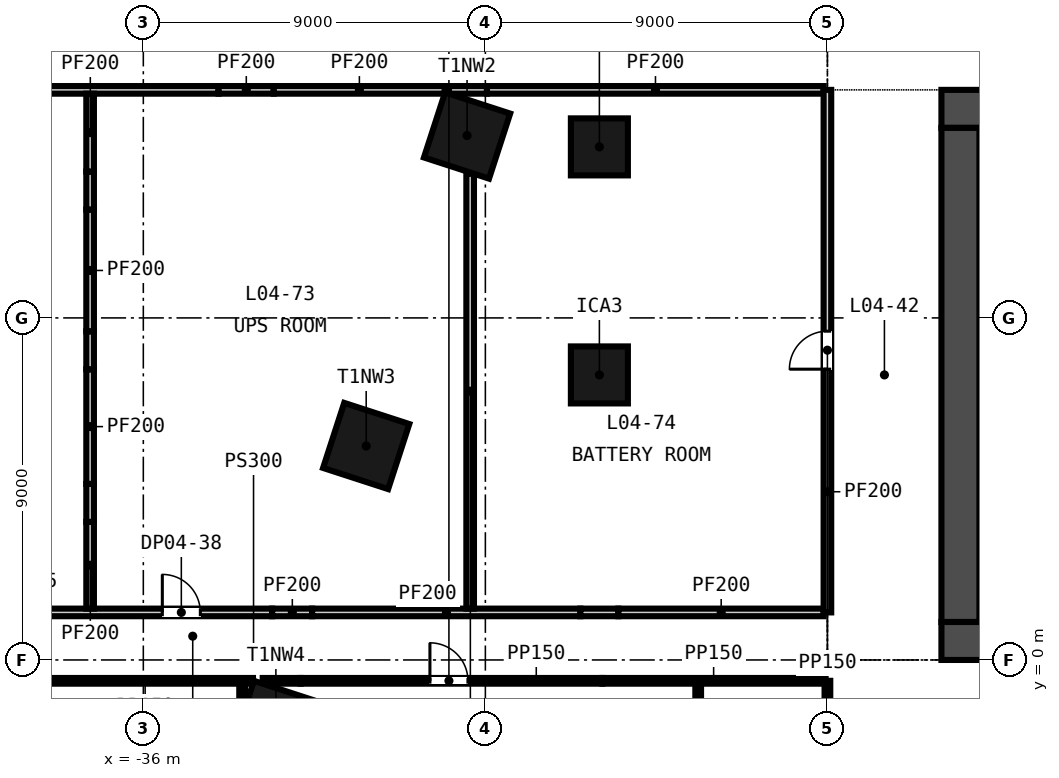
"""IFC4 building model, lengths in metres.
Left out: names, types, materials, properties, quantities, classifications, styles, units other than length and angle.
Written with IfcOpenShell. Run it as: python <this file> out.ifc"""

import sys

from ifc_helpers import new_model, si_unit, direction, frame, frame_2d, origin, origin_2d, place, context, subcontext, project, spatial, rectangle, extrude, element, fill, save


model = new_model("IFC4")
c1 = context("Model", 3, precision=1e-05, world=origin(), true_north=direction((0.0, 1.0)))
c2 = subcontext(c1, "Body", "Model", "MODEL_VIEW")
j1 = project(units=[si_unit("LENGTHUNIT", "METRE"), si_unit("PLANEANGLEUNIT", "RADIAN")], contexts=[c1])
p1 = place(None, origin())
s1 = spatial("IfcSite", under=j1, at=p1, CompositionType="ELEMENT")
p2 = place(p1, origin())
s2 = spatial("IfcBuilding", under=s1, at=p2, CompositionType="ELEMENT")
p3 = place(p2, frame((0.0, 0.0, 27.0)))
s3 = spatial("IfcBuildingStorey", under=s2, at=p3, CompositionType="ELEMENT", Elevation=27.0)
p4 = place(p3, frame((-15.0, 0.5, -0.3), z_axis=(0.0, 0.0, 1.0), x_axis=(1.0, 0.0, 0.0)))
e1 = element("IfcWall", 1, at=p4, inside=s3, PredefinedType="SOLIDWALL", context=c2, shape_type="SweptSolid", body=[
    extrude(rectangle(XDim=30.0, YDim=1.0, at=frame_2d((15.0, 0.0))), origin(), (0.0, 0.0, 1.0), 4.5),
])
p5 = place(p4, frame((5.8, 0.0, 0.3)))
e2 = element("IfcOpeningElement", 2, at=p5, cuts=e1, PredefinedType="OPENING", context=c2, shape_type="SweptSolid", body=[
    extrude(rectangle(XDim=2.4, YDim=2.4, at=frame_2d((1.2, 1.2))), frame((0.0, 0.51, 0.0), z_axis=(0.0, -1.0, 0.0), x_axis=(1.0, 0.0, 0.0)), (0.0, 0.0, 1.0), 1.02),
])
p6 = place(p4, frame((13.8, 0.0, 0.3)))
e3 = element("IfcOpeningElement", 3, at=p6, cuts=e1, PredefinedType="OPENING", context=c2, shape_type="SweptSolid", body=[
    extrude(rectangle(XDim=2.4, YDim=2.4, at=frame_2d((1.2, 1.2))), frame((0.0, 0.51, 0.0), z_axis=(0.0, -1.0, 0.0), x_axis=(1.0, 0.0, 0.0)), (0.0, 0.0, 1.0), 1.02),
])
p7 = place(p4, frame((21.8, 0.0, 0.3)))
e4 = element("IfcOpeningElement", 4, at=p7, cuts=e1, PredefinedType="OPENING", context=c2, shape_type="SweptSolid", body=[
    extrude(rectangle(XDim=2.4, YDim=2.4, at=frame_2d((1.2, 1.2))), frame((0.0, 0.51, 0.0), z_axis=(0.0, -1.0, 0.0), x_axis=(1.0, 0.0, 0.0)), (0.0, 0.0, 1.0), 1.02),
])
p8 = place(p4, frame((1.5, 0.0, 0.3)))
e5 = element("IfcOpeningElement", 5, at=p8, cuts=e1, PredefinedType="OPENING", context=c2, shape_type="SweptSolid", body=[
    extrude(rectangle(XDim=1.2, YDim=2.1, at=frame_2d((0.6, 1.05))), frame((0.0, 0.51, 0.0), z_axis=(0.0, -1.0, 0.0), x_axis=(1.0, 0.0, 0.0)), (0.0, 0.0, 1.0), 1.02),
])
p9 = place(p4, frame((27.3, 0.0, 0.3)))
e6 = element("IfcOpeningElement", 6, at=p9, cuts=e1, PredefinedType="OPENING", context=c2, shape_type="SweptSolid", body=[
    extrude(rectangle(XDim=1.2, YDim=2.1, at=frame_2d((0.6, 1.05))), frame((0.0, 0.51, 0.0), z_axis=(0.0, -1.0, 0.0), x_axis=(1.0, 0.0, 0.0)), (0.0, 0.0, 1.0), 1.02),
])
p10 = place(p3, frame((-15.0, 14.5, -0.3), z_axis=(0.0, 0.0, 1.0), x_axis=(1.0, 0.0, 0.0)))
e7 = element("IfcWall", 7, at=p10, inside=s3, PredefinedType="SOLIDWALL", context=c2, shape_type="SweptSolid", body=[
    extrude(rectangle(XDim=30.0, YDim=1.0, at=frame_2d((15.0, 0.0))), origin(), (0.0, 0.0, 1.0), 4.5),
])
p11 = place(p10, frame((9.25, 0.0, 0.3)))
e8 = element("IfcOpeningElement", 8, at=p11, cuts=e7, PredefinedType="OPENING", context=c2, shape_type="SweptSolid", body=[
    extrude(rectangle(XDim=1.5, YDim=2.1, at=frame_2d((0.75, 1.05))), frame((0.0, 0.51, 0.0), z_axis=(0.0, -1.0, 0.0), x_axis=(1.0, 0.0, 0.0)), (0.0, 0.0, 1.0), 1.02),
])
p12 = place(p10, frame((19.4, 0.0, 0.3)))
e9 = element("IfcOpeningElement", 9, at=p12, cuts=e7, PredefinedType="OPENING", context=c2, shape_type="SweptSolid", body=[
    extrude(rectangle(XDim=1.5, YDim=2.1, at=frame_2d((0.75, 1.05))), frame((0.0, 0.51, 0.0), z_axis=(0.0, -1.0, 0.0), x_axis=(1.0, 0.0, 0.0)), (0.0, 0.0, 1.0), 1.02),
])
p13 = place(p10, frame((1.5, 0.0, 0.3)))
e10 = element("IfcOpeningElement", 10, at=p13, cuts=e7, PredefinedType="OPENING", context=c2, shape_type="SweptSolid", body=[
    extrude(rectangle(XDim=1.2, YDim=2.1, at=frame_2d((0.6, 1.05))), frame((0.0, 0.51, 0.0), z_axis=(0.0, -1.0, 0.0), x_axis=(1.0, 0.0, 0.0)), (0.0, 0.0, 1.0), 1.02),
])
p14 = place(p10, frame((27.3, 0.0, 0.3)))
e11 = element("IfcOpeningElement", 11, at=p14, cuts=e7, PredefinedType="OPENING", context=c2, shape_type="SweptSolid", body=[
    extrude(rectangle(XDim=1.2, YDim=2.1, at=frame_2d((0.6, 1.05))), frame((0.0, 0.51, 0.0), z_axis=(0.0, -1.0, 0.0), x_axis=(1.0, 0.0, 0.0)), (0.0, 0.0, 1.0), 1.02),
])
p15 = place(p3, frame((-14.5, 1.0, -0.3), z_axis=(0.0, 0.0, 1.0), x_axis=(0.0, 1.0, 0.0)))
e12 = element("IfcWall", 12, at=p15, inside=s3, PredefinedType="SOLIDWALL", context=c2, shape_type="SweptSolid", body=[
    extrude(rectangle(XDim=13.0, YDim=1.0, at=frame_2d((6.5, 0.0))), origin(), (0.0, 0.0, 1.0), 4.5),
])
for number, where, z_axis, x_axis in (
    (13, (-27.482, 13.799, -0.3), (0.0, 0.0, 1.0), (-0.309, -0.951, 0.0)),
    (14, (-30.136, 5.63, -0.3), (0.0, 0.0, 1.0), (-0.309, -0.951, 0.0)),
    (15, (-32.512, -1.683, -0.3), (0.0, 0.0, 1.0), (-0.309, -0.951, 0.0)),
):
    element("IfcColumn", number, at=place(p3, frame(where, z_axis=z_axis, x_axis=x_axis)), inside=s3, PredefinedType="COLUMN", context=c2, shape_type="SweptSolid", body=[
        extrude(rectangle(XDim=1.8, YDim=1.8, at=origin_2d()), origin(), (0.0, 0.0, 1.0), 4.5),
    ])
for number, where, z_axis, x_axis in (
    (16, (-24.0, 7.5, -0.3), (0.0, 0.0, 1.0), (1.0, 0.0, 0.0)),
    (17, (-24.0, 13.5, -0.3), (0.0, 0.0, 1.0), (1.0, 0.0, 0.0)),
):
    element("IfcColumn", number, at=place(p3, frame(where, z_axis=z_axis, x_axis=x_axis)), inside=s3, PredefinedType="COLUMN", context=c2, shape_type="SweptSolid", body=[
        extrude(rectangle(XDim=1.5, YDim=1.5, at=origin_2d()), origin(), (0.0, 0.0, 1.0), 4.5),
    ])
p16 = place(p3, frame((-51.0, -0.549, 0.0), z_axis=(0.0, 0.0, 1.0), x_axis=(1.0, 0.0, 0.0)))
e18 = element("IfcWall", 18, at=p16, inside=s3, PredefinedType="PARTITIONING", context=c2, shape_type="SweptSolid", body=[
    extrude(rectangle(XDim=17.886, YDim=0.15, at=frame_2d((8.943, 0.0))), origin(), (0.0, 0.0, 1.0), 4.2),
])
p17 = place(p16, frame((4.9, 0.0, 0.0)))
e19 = element("IfcOpeningElement", 19, at=p17, cuts=e18, PredefinedType="OPENING", context=c2, shape_type="SweptSolid", body=[
    extrude(rectangle(XDim=1.0, YDim=2.1, at=frame_2d((0.5, 1.05))), frame((0.0, 0.085, 0.0), z_axis=(0.0, -1.0, 0.0), x_axis=(1.0, 0.0, 0.0)), (0.0, 0.0, 1.0), 0.17),
])
p18 = place(p16, frame((11.15, 0.0, 0.0)))
e20 = element("IfcOpeningElement", 20, at=p18, cuts=e18, PredefinedType="OPENING", context=c2, shape_type="SweptSolid", body=[
    extrude(rectangle(XDim=1.0, YDim=2.1, at=frame_2d((0.5, 1.05))), frame((0.0, 0.085, 0.0), z_axis=(0.0, -1.0, 0.0), x_axis=(1.0, 0.0, 0.0)), (0.0, 0.0, 1.0), 0.17),
])
p19 = place(p3, frame((-32.859, -0.549, 0.0), z_axis=(0.0, 0.0, 1.0), x_axis=(1.0, 0.0, 0.0)))
e21 = element("IfcWall", 21, at=p19, inside=s3, PredefinedType="PARTITIONING", context=c2, shape_type="SweptSolid", body=[
    extrude(rectangle(XDim=1.0, YDim=0.15, at=frame_2d((0.5, 0.0))), origin(), (0.0, 0.0, 1.0), 3.2),
])
p20 = place(p3, frame((-31.859, -0.549, 0.0), z_axis=(0.0, 0.0, 1.0), x_axis=(1.0, 0.0, 0.0)))
e22 = element("IfcWall", 22, at=p20, inside=s3, PredefinedType="PARTITIONING", context=c2, shape_type="SweptSolid", body=[
    extrude(rectangle(XDim=7.936, YDim=0.15, at=frame_2d((3.968, 0.0))), origin(), (0.0, 0.0, 1.0), 4.2),
])
p21 = place(p20, frame((3.4, 0.0, 0.0)))
e23 = element("IfcOpeningElement", 23, at=p21, cuts=e22, PredefinedType="OPENING", context=c2, shape_type="SweptSolid", body=[
    extrude(rectangle(XDim=1.0, YDim=2.1, at=frame_2d((0.5, 1.05))), frame((0.0, 0.085, 0.0), z_axis=(0.0, -1.0, 0.0), x_axis=(1.0, 0.0, 0.0)), (0.0, 0.0, 1.0), 0.17),
])
p22 = place(p3, frame((-23.923, -0.549, 0.0), z_axis=(0.0, 0.0, 1.0), x_axis=(1.0, 0.0, 0.0)))
e24 = element("IfcWall", 24, at=p22, inside=s3, PredefinedType="PARTITIONING", context=c2, shape_type="SweptSolid", body=[
    extrude(rectangle(XDim=5.848, YDim=0.15, at=frame_2d((2.924, 0.0))), origin(), (0.0, 0.0, 1.0), 3.521),
])
p23 = place(p3, frame((-51.4, 1.251, 0.0), z_axis=(0.0, 0.0, 1.0), x_axis=(1.0, 0.0, 0.0)))
e25 = element("IfcWall", 25, at=p23, inside=s3, PredefinedType="PARTITIONING", context=c2, shape_type="SweptSolid", body=[
    extrude(rectangle(XDim=18.79, YDim=0.2, at=frame_2d((9.395, 0.0))), origin(), (0.0, 0.0, 1.0), 4.2),
])
p24 = place(p23, frame((6.15, 0.0, 0.0)))
e26 = element("IfcOpeningElement", 26, at=p24, cuts=e25, PredefinedType="OPENING", context=c2, shape_type="SweptSolid", body=[
    extrude(rectangle(XDim=1.8, YDim=2.4, at=frame_2d((0.9, 1.2))), frame((0.0, 0.11, 0.0), z_axis=(0.0, -1.0, 0.0), x_axis=(1.0, 0.0, 0.0)), (0.0, 0.0, 1.0), 0.22),
])
p25 = place(p23, frame((15.9, 0.0, 0.0)))
e27 = element("IfcOpeningElement", 27, at=p25, cuts=e25, PredefinedType="OPENING", context=c2, shape_type="SweptSolid", body=[
    extrude(rectangle(XDim=1.0, YDim=2.1, at=frame_2d((0.5, 1.05))), frame((0.0, 0.11, 0.0), z_axis=(0.0, -1.0, 0.0), x_axis=(1.0, 0.0, 0.0)), (0.0, 0.0, 1.0), 0.22),
])
p26 = place(p3, frame((-32.61, 1.251, 0.0), z_axis=(0.0, 0.0, 1.0), x_axis=(1.0, 0.0, 0.0)))
e28 = element("IfcWall", 28, at=p26, inside=s3, PredefinedType="PARTITIONING", context=c2, shape_type="SweptSolid", body=[
    extrude(rectangle(XDim=1.052, YDim=0.2, at=frame_2d((0.526, 0.0))), origin(), (0.0, 0.0, 1.0), 3.2),
])
p27 = place(p3, frame((-31.559, 1.251, 0.0), z_axis=(0.0, 0.0, 1.0), x_axis=(1.0, 0.0, 0.0)))
e29 = element("IfcWall", 29, at=p27, inside=s3, PredefinedType="PARTITIONING", context=c2, shape_type="SweptSolid", body=[
    extrude(rectangle(XDim=7.059, YDim=0.2, at=frame_2d((3.529, 0.0))), origin(), (0.0, 0.0, 1.0), 4.2),
])
p28 = place(p3, frame((-24.5, 1.251, 0.0), z_axis=(0.0, 0.0, 1.0), x_axis=(1.0, 0.0, 0.0)))
e30 = element("IfcWall", 30, at=p28, inside=s3, PredefinedType="PARTITIONING", context=c2, shape_type="SweptSolid", body=[
    extrude(rectangle(XDim=1.0, YDim=0.2, at=frame_2d((0.5, 0.0))), origin(), (0.0, 0.0, 1.0), 3.286),
])
p29 = place(p3, frame((-23.5, 1.251, 0.0), z_axis=(0.0, 0.0, 1.0), x_axis=(1.0, 0.0, 0.0)))
e31 = element("IfcWall", 31, at=p29, inside=s3, PredefinedType="PARTITIONING", context=c2, shape_type="SweptSolid", body=[
    extrude(rectangle(XDim=5.4, YDim=0.2, at=frame_2d((2.7, 0.0))), origin(), (0.0, 0.0, 1.0), 4.2),
])
p30 = place(p3, frame((-44.615, 15.0, 0.0), z_axis=(0.0, 0.0, 1.0), x_axis=(1.0, 0.0, 0.0)))
e32 = element("IfcWall", 32, at=p30, inside=s3, PredefinedType="PARTITIONING", context=c2, shape_type="SweptSolid", body=[
    extrude(rectangle(XDim=10.594, YDim=0.2, at=frame_2d((5.297, 0.0))), origin(), (0.0, 0.0, 1.0), 4.2),
])
p31 = place(p3, frame((-34.021, 15.0, 0.0), z_axis=(0.0, 0.0, 1.0), x_axis=(1.0, 0.0, 0.0)))
e33 = element("IfcWall", 33, at=p31, inside=s3, PredefinedType="PARTITIONING", context=c2, shape_type="SweptSolid", body=[
    extrude(rectangle(XDim=1.452, YDim=0.2, at=frame_2d((0.726, 0.0))), origin(), (0.0, 0.0, 1.0), 3.111),
])
p32 = place(p3, frame((-32.569, 15.0, 0.0), z_axis=(0.0, 0.0, 1.0), x_axis=(1.0, 0.0, 0.0)))
e34 = element("IfcWall", 34, at=p32, inside=s3, PredefinedType="PARTITIONING", context=c2, shape_type="SweptSolid", body=[
    extrude(rectangle(XDim=4.499, YDim=0.2, at=frame_2d((2.25, 0.0))), origin(), (0.0, 0.0, 1.0), 4.2),
])
p33 = place(p3, frame((-27.958, 15.0, 0.0), z_axis=(0.0, 0.0, 1.0), x_axis=(1.0, 0.0, 0.0)))
e35 = element("IfcWall", 35, at=p33, inside=s3, PredefinedType="PARTITIONING", context=c2, shape_type="SweptSolid", body=[
    extrude(rectangle(XDim=1.0, YDim=0.2, at=frame_2d((0.5, 0.0))), origin(), (0.0, 0.0, 1.0), 3.2),
])
p34 = place(p3, frame((-26.958, 15.0, 0.0), z_axis=(0.0, 0.0, 1.0), x_axis=(1.0, 0.0, 0.0)))
e36 = element("IfcWall", 36, at=p34, inside=s3, PredefinedType="PARTITIONING", context=c2, shape_type="SweptSolid", body=[
    extrude(rectangle(XDim=8.858, YDim=0.2, at=frame_2d((4.429, 0.0))), origin(), (0.0, 0.0, 1.0), 4.2),
])
p35 = place(p3, frame((-37.4, 1.351, 0.0), z_axis=(0.0, 0.0, 1.0), x_axis=(0.0, 1.0, 0.0)))
e37 = element("IfcWall", 37, at=p35, inside=s3, PredefinedType="PARTITIONING", context=c2, shape_type="SweptSolid", body=[
    extrude(rectangle(XDim=2.282, YDim=0.2, at=frame_2d((1.141, 0.0))), origin(), (0.0, 0.0, 1.0), 4.2),
])
p36 = place(p3, frame((-37.4, 3.633, 0.0), z_axis=(0.0, 0.0, 1.0), x_axis=(0.0, 1.0, 0.0)))
e38 = element("IfcWall", 38, at=p36, inside=s3, PredefinedType="PARTITIONING", context=c2, shape_type="SweptSolid", body=[
    extrude(rectangle(XDim=1.0, YDim=0.2, at=frame_2d((0.5, 0.0))), origin(), (0.0, 0.0, 1.0), 3.286),
])
p37 = place(p3, frame((-37.4, 4.633, 0.0), z_axis=(0.0, 0.0, 1.0), x_axis=(0.0, 1.0, 0.0)))
e39 = element("IfcWall", 39, at=p37, inside=s3, PredefinedType="PARTITIONING", context=c2, shape_type="SweptSolid", body=[
    extrude(rectangle(XDim=3.014, YDim=0.2, at=frame_2d((1.507, 0.0))), origin(), (0.0, 0.0, 1.0), 4.2),
])
p38 = place(p3, frame((-37.4, 7.647, 0.0), z_axis=(0.0, 0.0, 1.0), x_axis=(0.0, 1.0, 0.0)))
e40 = element("IfcWall", 40, at=p38, inside=s3, PredefinedType="PARTITIONING", context=c2, shape_type="SweptSolid", body=[
    extrude(rectangle(XDim=1.0, YDim=0.2, at=frame_2d((0.5, 0.0))), origin(), (0.0, 0.0, 1.0), 3.286),
])
p39 = place(p3, frame((-37.4, 8.647, 0.0), z_axis=(0.0, 0.0, 1.0), x_axis=(0.0, 1.0, 0.0)))
e41 = element("IfcWall", 41, at=p39, inside=s3, PredefinedType="PARTITIONING", context=c2, shape_type="SweptSolid", body=[
    extrude(rectangle(XDim=3.204, YDim=0.2, at=frame_2d((1.602, 0.0))), origin(), (0.0, 0.0, 1.0), 4.2),
])
p40 = place(p3, frame((-37.4, 11.851, 0.0), z_axis=(0.0, 0.0, 1.0), x_axis=(0.0, 1.0, 0.0)))
e42 = element("IfcWall", 42, at=p40, inside=s3, PredefinedType="PARTITIONING", context=c2, shape_type="SweptSolid", body=[
    extrude(rectangle(XDim=1.0, YDim=0.2, at=frame_2d((0.5, 0.0))), origin(), (0.0, 0.0, 1.0), 3.219),
])
p41 = place(p3, frame((-37.4, 12.851, 0.0), z_axis=(0.0, 0.0, 1.0), x_axis=(0.0, 1.0, 0.0)))
e43 = element("IfcWall", 43, at=p41, inside=s3, PredefinedType="PARTITIONING", context=c2, shape_type="SweptSolid", body=[
    extrude(rectangle(XDim=2.049, YDim=0.2, at=frame_2d((1.025, 0.0))), origin(), (0.0, 0.0, 1.0), 4.2),
])
p42 = place(p3, frame((-33.4, -1.272, 0.0), z_axis=(0.0, 0.0, 1.0), x_axis=(0.0, 1.0, 0.0)))
e44 = element("IfcWall", 44, at=p42, inside=s3, PredefinedType="PARTITIONING", context=c2, shape_type="SweptSolid", body=[
    extrude(rectangle(XDim=0.648, YDim=0.15, at=frame_2d((0.324, 0.0))), origin(), (0.0, 0.0, 1.0), 4.2),
])
p43 = place(p3, frame((-27.4, 1.351, 0.0), z_axis=(0.0, 0.0, 1.0), x_axis=(0.0, 1.0, 0.0)))
e45 = element("IfcWall", 45, at=p43, inside=s3, PredefinedType="PARTITIONING", context=c2, shape_type="SweptSolid", body=[
    extrude(rectangle(XDim=11.443, YDim=0.2, at=frame_2d((5.721, 0.0))), origin(), (0.0, 0.0, 1.0), 4.2),
])
p44 = place(p3, frame((-21.4, -15.389, 0.0), z_axis=(0.0, 0.0, 1.0), x_axis=(0.0, 1.0, 0.0)))
e46 = element("IfcWall", 46, at=p44, inside=s3, PredefinedType="PARTITIONING", context=c2, shape_type="SweptSolid", body=[
    extrude(rectangle(XDim=14.765, YDim=0.15, at=frame_2d((7.382, 0.0))), origin(), (0.0, 0.0, 1.0), 4.2),
])
p45 = place(p3, frame((-18.0, -3.2, 0.0), z_axis=(0.0, 0.0, 1.0), x_axis=(0.0, 1.0, 0.0)))
e47 = element("IfcWall", 47, at=p45, inside=s3, PredefinedType="PARTITIONING", context=c2, shape_type="SweptSolid", body=[
    extrude(rectangle(XDim=2.651, YDim=0.15, at=frame_2d((1.326, 0.0))), origin(), (0.0, 0.0, 1.0), 4.2),
])
p46 = place(p3, frame((-18.0, 1.251, 0.0), z_axis=(0.0, 0.0, 1.0), x_axis=(0.0, 1.0, 0.0)))
e48 = element("IfcWall", 48, at=p46, inside=s3, PredefinedType="PARTITIONING", context=c2, shape_type="SweptSolid", body=[
    extrude(rectangle(XDim=13.749, YDim=0.2, at=frame_2d((6.875, 0.0))), origin(), (0.0, 0.0, 1.0), 4.2),
])
p47 = place(p46, frame((6.4, 0.0, 0.0)))
e49 = element("IfcOpeningElement", 49, at=p47, cuts=e48, PredefinedType="OPENING", context=c2, shape_type="SweptSolid", body=[
    extrude(rectangle(XDim=1.0, YDim=2.1, at=frame_2d((0.5, 1.05))), frame((0.0, 0.11, 0.0), z_axis=(0.0, -1.0, 0.0), x_axis=(1.0, 0.0, 0.0)), (0.0, 0.0, 1.0), 0.22),
])
p48 = place(p21, origin())
e50 = element("IfcDoor", 50, at=p48, inside=s3, OperationType="SINGLE_SWING_LEFT", PredefinedType="DOOR", context=c2, shape_type="SweptSolid", body=[
    extrude(rectangle(XDim=1.0, YDim=2.1, at=frame_2d((0.5, 1.05))), frame((0.0, 0.025, 0.0), z_axis=(0.0, -1.0, 0.0), x_axis=(1.0, 0.0, 0.0)), (0.0, 0.0, 1.0), 0.05),
])
fill(e23, e50)
p49 = place(p25, origin())
e51 = element("IfcDoor", 51, at=p49, inside=s3, OperationType="SINGLE_SWING_LEFT", PredefinedType="DOOR", context=c2, shape_type="SweptSolid", body=[
    extrude(rectangle(XDim=1.0, YDim=2.1, at=frame_2d((0.5, 1.05))), frame((0.0, 0.025, 0.0), z_axis=(0.0, -1.0, 0.0), x_axis=(1.0, 0.0, 0.0)), (0.0, 0.0, 1.0), 0.05),
])
fill(e27, e51)
p50 = place(p47, origin())
e52 = element("IfcDoor", 52, at=p50, inside=s3, OperationType="SINGLE_SWING_LEFT", PredefinedType="DOOR", context=c2, shape_type="SweptSolid", body=[
    extrude(rectangle(XDim=1.0, YDim=2.1, at=frame_2d((0.5, 1.05))), frame((0.0, 0.025, 0.0), z_axis=(0.0, -1.0, 0.0), x_axis=(1.0, 0.0, 0.0)), (0.0, 0.0, 1.0), 0.05),
])
fill(e49, e52)
save(model, sys.argv[1])
